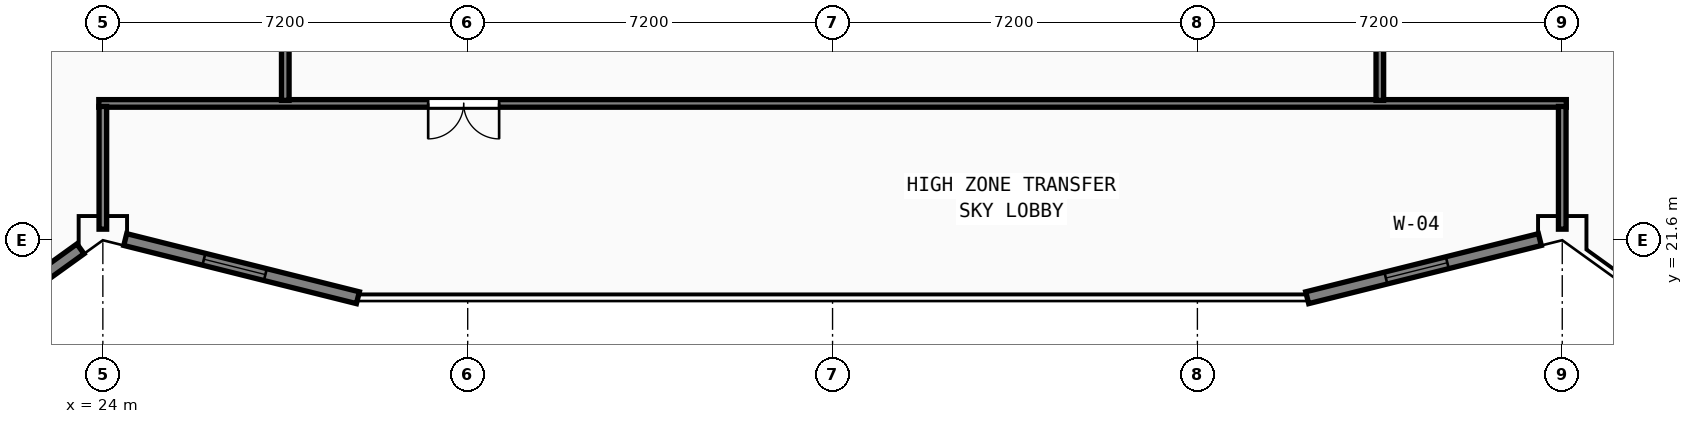
"""IFC4 building model, lengths in metres.
Left out: names, types, materials, properties, quantities, classifications, styles, units other than length and angle.
Written with IfcOpenShell. Run it as: python <this file> out.ifc"""

import sys

from ifc_helpers import new_model, si_unit, direction, frame, frame_2d, origin, origin_2d, place, context, subcontext, project, spatial, rectangle, hollow_rectangle, extrude, element, fill, save


model = new_model("IFC4")
c1 = context("Model", 3, precision=1e-05, world=origin(), true_north=direction((0.0, 1.0)))
c2 = subcontext(c1, "Body", "Model", "MODEL_VIEW")
j1 = project(units=[si_unit("LENGTHUNIT", "METRE"), si_unit("PLANEANGLEUNIT", "RADIAN")], contexts=[c1])
p1 = place(None, origin())
s1 = spatial("IfcSite", under=j1, at=p1, CompositionType="ELEMENT")
p2 = place(p1, origin())
s2 = spatial("IfcBuilding", under=s1, at=p2, CompositionType="ELEMENT")
p3 = place(p2, frame((0.0, 0.0, 164.6)))
s3 = spatial("IfcBuildingStorey", under=s2, at=p3, CompositionType="ELEMENT", Elevation=164.6)
for number, where, z_axis, x_axis in (
    (1, (24.0, 21.6, 0.0), (0.0, 0.0, 1.0), (1.0, 0.0, 0.0)),
    (2, (52.8, 21.6, 0.0), (0.0, 0.0, 1.0), (1.0, 0.0, 0.0)),
    (3, (31.2, 21.6, 0.0), (0.0, 0.0, 1.0), (1.0, 0.0, 0.0)),
    (4, (45.6, 21.6, 0.0), (0.0, 0.0, 1.0), (1.0, 0.0, 0.0)),
):
    element("IfcColumn", number, at=place(p3, frame(where, z_axis=z_axis, x_axis=x_axis)), inside=s3, PredefinedType="COLUMN", context=c2, shape_type="SweptSolid", body=[
        extrude(hollow_rectangle(XDim=0.9, YDim=0.9, WallThickness=0.034, at=origin_2d()), origin(), (0.0, 0.0, 1.0), 4.4),
    ])
p4 = place(p3, frame((38.4, 21.6, 0.0), z_axis=(0.0, 0.0, 1.0), x_axis=(1.0, 0.0, 0.0)))
e5 = element("IfcColumn", 5, at=p4, inside=s3, PredefinedType="COLUMN", context=c2, shape_type="SweptSolid", body=[
    extrude(hollow_rectangle(XDim=0.8, YDim=0.8, WallThickness=0.03, at=origin_2d()), origin(), (0.0, 0.0, 1.0), 4.4),
])
p5 = place(p3, frame((47.767, 20.465, 0.0), z_axis=(0.0, 0.0, 1.0), x_axis=(0.9701333955, 0.242572040715, 0.0)))
e6 = element("IfcWall", 6, at=p5, inside=s3, PredefinedType="SOLIDWALL", context=c2, shape_type="SweptSolid", body=[
    extrude(rectangle(XDim=4.732, YDim=0.24, at=frame_2d((2.366, 0.0))), origin(), (0.0, 0.0, 1.0), 3.815),
])
p6 = place(p5, frame((1.6, 0.0, 0.85)))
e7 = element("IfcOpeningElement", 7, at=p6, cuts=e6, PredefinedType="OPENING", context=c2, shape_type="SweptSolid", body=[
    extrude(rectangle(XDim=1.25, YDim=1.95, at=frame_2d((0.625, 0.975))), frame((0.0, 0.13, 0.0), z_axis=(0.0, -1.0, 0.0), x_axis=(1.0, 0.0, 0.0)), (0.0, 0.0, 1.0), 0.26),
])
p7 = place(p3, frame((14.075, 14.602, 0.0), z_axis=(0.0, 0.0, 1.0), x_axis=(0.811539493337, 0.584297570381, 0.0)))
e8 = element("IfcWall", 8, at=p7, inside=s3, PredefinedType="SOLIDWALL", context=c2, shape_type="SweptSolid", body=[
    extrude(rectangle(XDim=11.685, YDim=0.24, at=frame_2d((5.842, 0.0))), origin(), (0.0, 0.0, 1.0), 3.815),
])
p8 = place(p7, frame((1.6, 0.0, 0.85)))
e9 = element("IfcOpeningElement", 9, at=p8, cuts=e8, PredefinedType="OPENING", context=c2, shape_type="SweptSolid", body=[
    extrude(rectangle(XDim=1.25, YDim=1.95, at=frame_2d((0.625, 0.975))), frame((0.0, 0.13, 0.0), z_axis=(0.0, -1.0, 0.0), x_axis=(1.0, 0.0, 0.0)), (0.0, 0.0, 1.0), 0.26),
])
p9 = place(p7, frame((7.0, 0.0, 0.85)))
e10 = element("IfcOpeningElement", 10, at=p9, cuts=e8, PredefinedType="OPENING", context=c2, shape_type="SweptSolid", body=[
    extrude(rectangle(XDim=1.25, YDim=1.95, at=frame_2d((0.625, 0.975))), frame((0.0, 0.13, 0.0), z_axis=(0.0, -1.0, 0.0), x_axis=(1.0, 0.0, 0.0)), (0.0, 0.0, 1.0), 0.26),
])
p10 = place(p3, frame((24.442, 21.613, 0.0), z_axis=(0.0, 0.0, 1.0), x_axis=(0.970136430837, -0.242559900978, 0.0)))
e11 = element("IfcWall", 11, at=p10, inside=s3, PredefinedType="SOLIDWALL", context=c2, shape_type="SweptSolid", body=[
    extrude(rectangle(XDim=4.733, YDim=0.24, at=frame_2d((2.366, 0.0))), origin(), (0.0, 0.0, 1.0), 3.815),
])
p11 = place(p10, frame((1.6, 0.0, 0.85)))
e12 = element("IfcOpeningElement", 12, at=p11, cuts=e11, PredefinedType="OPENING", context=c2, shape_type="SweptSolid", body=[
    extrude(rectangle(XDim=1.25, YDim=1.95, at=frame_2d((0.625, 0.975))), frame((0.0, 0.13, 0.0), z_axis=(0.0, -1.0, 0.0), x_axis=(1.0, 0.0, 0.0)), (0.0, 0.0, 1.0), 0.26),
])
p12 = place(p3, frame((23.92, 24.3, 0.0), z_axis=(0.0, 0.0, 1.0), x_axis=(1.0, 0.0, 0.0)))
e13 = element("IfcWall", 13, at=p12, inside=s3, PredefinedType="PARTITIONING", context=c2, shape_type="SweptSolid", body=[
    extrude(rectangle(XDim=28.96, YDim=0.15, at=frame_2d((14.48, 0.0))), origin(), (0.0, 0.0, 1.0), 4.22),
])
p13 = place(p12, frame((7.9, 0.0, 0.0), z_axis=(0.0, 0.0, 1.0), x_axis=(-1.0, 0.0, 0.0)))
e14 = element("IfcOpeningElement", 14, at=p13, cuts=e13, PredefinedType="OPENING", context=c2, shape_type="SweptSolid", body=[
    extrude(rectangle(XDim=1.4, YDim=2.18, at=frame_2d((0.7, 1.09))), frame((0.0, 0.085, 0.0), z_axis=(0.0, -1.0, 0.0), x_axis=(1.0, 0.0, 0.0)), (0.0, 0.0, 1.0), 0.17),
])
for number, where, z_axis, x_axis in (
    (15, (24.0, 21.819, 0.0), (0.0, 0.0, 1.0), (0.0, 1.0, 0.0)),
    (16, (52.8, 21.819, 0.0), (0.0, 0.0, 1.0), (0.0, 1.0, 0.0)),
):
    element("IfcWall", number, at=place(p3, frame(where, z_axis=z_axis, x_axis=x_axis)), inside=s3, PredefinedType="PARTITIONING", context=c2, shape_type="SweptSolid", body=[
        extrude(rectangle(XDim=2.421, YDim=0.15, at=frame_2d((1.211, 0.0))), origin(), (0.0, 0.0, 1.0), 3.815),
    ])
p14 = place(p3, frame((27.6, 24.36, 0.0), z_axis=(0.0, 0.0, 1.0), x_axis=(0.0, 1.0, 0.0)))
e17 = element("IfcWall", 17, at=p14, inside=s3, PredefinedType="PARTITIONING", context=c2, shape_type="SweptSolid", body=[
    extrude(rectangle(XDim=20.58, YDim=0.15, at=frame_2d((10.29, 0.0))), origin(), (0.0, 0.0, 1.0), 4.22),
])
p15 = place(p14, frame((14.188, 0.0, 0.0), z_axis=(0.0, 0.0, 1.0), x_axis=(-1.0, 0.0, 0.0)))
e18 = element("IfcOpeningElement", 18, at=p15, cuts=e17, PredefinedType="OPENING", context=c2, shape_type="SweptSolid", body=[
    extrude(rectangle(XDim=1.4, YDim=2.18, at=frame_2d((0.7, 1.09))), frame((0.0, 0.085, 0.0), z_axis=(0.0, -1.0, 0.0), x_axis=(1.0, 0.0, 0.0)), (0.0, 0.0, 1.0), 0.17),
])
p16 = place(p3, frame((49.2, 24.36, 0.0), z_axis=(0.0, 0.0, 1.0), x_axis=(0.0, 1.0, 0.0)))
e19 = element("IfcWall", 19, at=p16, inside=s3, PredefinedType="PARTITIONING", context=c2, shape_type="SweptSolid", body=[
    extrude(rectangle(XDim=6.58, YDim=0.15, at=frame_2d((3.29, 0.0))), origin(), (0.0, 0.0, 1.0), 4.22),
])
p17 = place(p16, frame((5.49, 0.0, 0.0)))
e20 = element("IfcOpeningElement", 20, at=p17, cuts=e19, PredefinedType="OPENING", context=c2, shape_type="SweptSolid", body=[
    extrude(rectangle(XDim=0.95, YDim=2.12, at=frame_2d((0.475, 1.06))), frame((0.0, 0.085, 0.0), z_axis=(0.0, -1.0, 0.0), x_axis=(1.0, 0.0, 0.0)), (0.0, 0.0, 1.0), 0.17),
])
p18 = place(p6, origin())
e21 = element("IfcWindow", 21, at=p18, inside=s3, PartitioningType="SINGLE_PANEL", PredefinedType="WINDOW", context=c2, shape_type="SweptSolid", body=[
    extrude(rectangle(XDim=1.25, YDim=1.95, at=frame_2d((0.625, 0.975))), frame((0.0, 0.03, 0.0), z_axis=(0.0, -1.0, 0.0), x_axis=(1.0, 0.0, 0.0)), (0.0, 0.0, 1.0), 0.06),
])
fill(e7, e21)
p19 = place(p11, origin())
e22 = element("IfcWindow", 22, at=p19, inside=s3, PartitioningType="SINGLE_PANEL", PredefinedType="WINDOW", context=c2, shape_type="SweptSolid", body=[
    extrude(rectangle(XDim=1.25, YDim=1.95, at=frame_2d((0.625, 0.975))), frame((0.0, 0.03, 0.0), z_axis=(0.0, -1.0, 0.0), x_axis=(1.0, 0.0, 0.0)), (0.0, 0.0, 1.0), 0.06),
])
fill(e12, e22)
p20 = place(p13, origin())
e23 = element("IfcDoor", 23, at=p20, inside=s3, OperationType="DOUBLE_DOOR_SINGLE_SWING", PredefinedType="DOOR", context=c2, shape_type="SweptSolid", body=[
    extrude(rectangle(XDim=1.4, YDim=2.18, at=frame_2d((0.7, 1.09))), frame((0.0, 0.025, 0.0), z_axis=(0.0, -1.0, 0.0), x_axis=(1.0, 0.0, 0.0)), (0.0, 0.0, 1.0), 0.05),
])
fill(e14, e23)
save(model, sys.argv[1])
